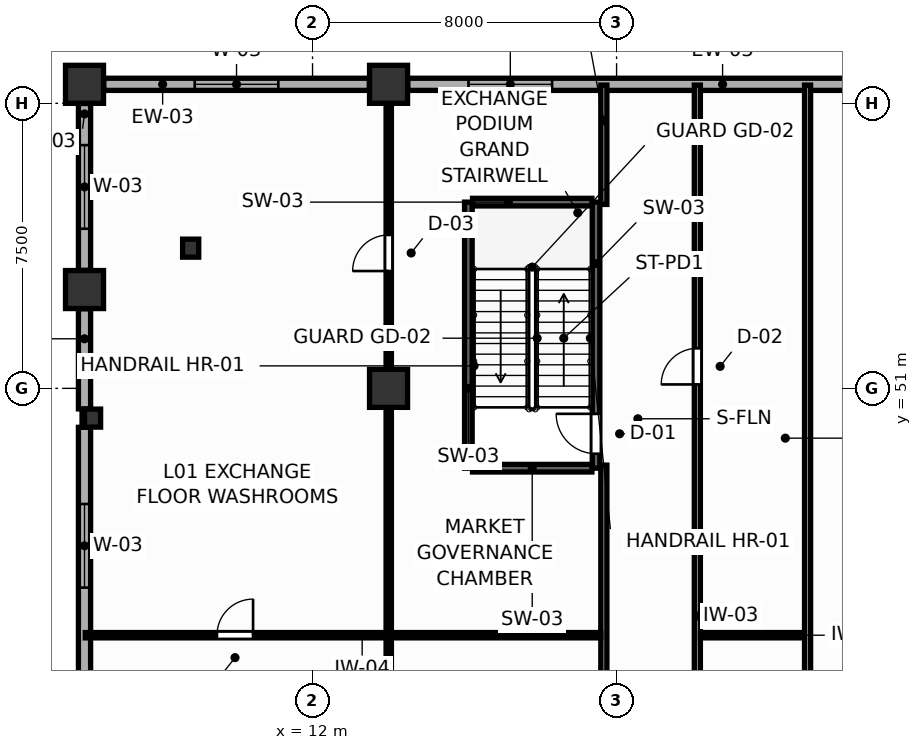
"""IFC4 building model, lengths in metres.
Left out: names, types, materials, properties, quantities, classifications, styles, units other than length and angle.
Written with IfcOpenShell. Run it as: python <this file> out.ifc"""

import sys

from ifc_helpers import new_model, si_unit, direction, frame, frame_2d, origin, origin_2d, place, context, subcontext, project, spatial, rectangle, i_section, extrude, source, transform, mapped, element, fill, save


model = new_model("IFC4")
c1 = context("Model", 3, precision=1e-05, world=origin(), true_north=direction((0.0, 1.0)))
c2 = subcontext(c1, "Body", "Model", "MODEL_VIEW")
j1 = project(units=[si_unit("LENGTHUNIT", "METRE"), si_unit("PLANEANGLEUNIT", "RADIAN")], contexts=[c1])
p1 = place(None, origin())
s1 = spatial("IfcSite", under=j1, at=p1, CompositionType="ELEMENT")
p2 = place(p1, origin())
s2 = spatial("IfcBuilding", under=s1, at=p2, CompositionType="ELEMENT")
p3 = place(p2, frame((0.0, 0.0, 4.8)))
s3 = spatial("IfcBuildingStorey", under=s2, at=p3, CompositionType="ELEMENT", Elevation=4.8)
m1 = source(origin(), c2, "Body", "SweptSolid", [
    extrude(rectangle(XDim=1.0, YDim=1.0, at=origin_2d()), origin(), (0.0, 0.0, 1.0), 4.8),
])
for number, where, z_axis, x_axis in (
    (1, (6.0, 53.6, 0.0), (0.0, 0.0, 1.0), (1.0, 0.0, 0.0)),
    (2, (6.0, 59.0, 0.0), (0.0, 0.0, 1.0), (1.0, 0.0, 0.0)),
    (3, (14.0, 59.0, 0.0), (0.0, 0.0, 1.0), (1.0, 0.0, 0.0)),
    (4, (14.0, 51.0, 0.0), (0.0, 0.0, 1.0), (1.0, 0.0, 0.0)),
):
    element("IfcColumn", number, at=place(p3, frame(where, z_axis=z_axis, x_axis=x_axis)), inside=s3, PredefinedType="COLUMN", context=c2, shape_type="MappedRepresentation", body=[
        mapped(m1, transform((0.0, 0.0, 0.0), scale=1.0)),
    ])
m2 = source(origin(), c2, "Body", "SweptSolid", [
    extrude(i_section(OverallWidth=0.424, OverallDepth=0.474, WebThickness=0.045, FlangeThickness=0.072, FilletRadius=0.015, at=origin_2d()), origin(), (0.0, 0.0, 1.0), 4.8),
])
for number, where, z_axis, x_axis in (
    (5, (8.793, 54.689, 0.0), (0.0, 0.0, 1.0), (1.0, 0.0, 0.0)),
    (6, (6.211, 50.217, 0.0), (0.0, 0.0, 1.0), (1.0, 0.0, 0.0)),
):
    element("IfcColumn", number, at=place(p3, frame(where, z_axis=z_axis, x_axis=x_axis)), inside=s3, PredefinedType="COLUMN", context=c2, shape_type="MappedRepresentation", body=[
        mapped(m2, transform((0.0, 0.0, 0.0), scale=1.0)),
    ])
p4 = place(p3, frame((6.505, 59.0, 0.0), z_axis=(0.0, 0.0, 1.0), x_axis=(1.0, 0.0, 0.0)))
e7 = element("IfcWall", 7, at=p4, inside=s3, PredefinedType="SOLIDWALL", context=c2, shape_type="SweptSolid", body=[
    extrude(rectangle(XDim=6.99, YDim=0.32, at=frame_2d((3.495, 0.0))), origin(), (0.0, 0.0, 1.0), 3.82),
])
p5 = place(p4, frame((2.395, 0.0, 0.75)))
e8 = element("IfcOpeningElement", 8, at=p5, cuts=e7, PredefinedType="OPENING", context=c2, shape_type="SweptSolid", body=[
    extrude(rectangle(XDim=2.2, YDim=2.0, at=frame_2d((1.1, 1.0))), frame((0.0, 0.17, 0.0), z_axis=(0.0, -1.0, 0.0), x_axis=(1.0, 0.0, 0.0)), (0.0, 0.0, 1.0), 0.34),
])
p6 = place(p3, frame((14.505, 59.0, 0.0), z_axis=(0.0, 0.0, 1.0), x_axis=(1.0, 0.0, 0.0)))
e9 = element("IfcWall", 9, at=p6, inside=s3, PredefinedType="SOLIDWALL", context=c2, shape_type="SweptSolid", body=[
    extrude(rectangle(XDim=12.59, YDim=0.32, at=frame_2d((6.295, 0.0))), origin(), (0.0, 0.0, 1.0), 3.82),
])
p7 = place(p6, frame((1.599, 0.0, 0.75)))
e10 = element("IfcOpeningElement", 10, at=p7, cuts=e9, PredefinedType="OPENING", context=c2, shape_type="SweptSolid", body=[
    extrude(rectangle(XDim=2.2, YDim=2.0, at=frame_2d((1.1, 1.0))), frame((0.0, 0.17, 0.0), z_axis=(0.0, -1.0, 0.0), x_axis=(1.0, 0.0, 0.0)), (0.0, 0.0, 1.0), 0.34),
])
p8 = place(p3, frame((6.0, 40.505, 0.0), z_axis=(0.0, 0.0, 1.0), x_axis=(0.0, 1.0, 0.0)))
e11 = element("IfcWall", 11, at=p8, inside=s3, PredefinedType="SOLIDWALL", context=c2, shape_type="SweptSolid", body=[
    extrude(rectangle(XDim=9.47, YDim=0.32, at=frame_2d((4.735, 0.0))), origin(), (0.0, 0.0, 1.0), 3.82),
])
p9 = place(p8, frame((5.253, 0.0, 0.75)))
e12 = element("IfcOpeningElement", 12, at=p9, cuts=e11, PredefinedType="OPENING", context=c2, shape_type="SweptSolid", body=[
    extrude(rectangle(XDim=2.2, YDim=2.0, at=frame_2d((1.1, 1.0))), frame((0.0, 0.17, 0.0), z_axis=(0.0, -1.0, 0.0), x_axis=(1.0, 0.0, 0.0)), (0.0, 0.0, 1.0), 0.34),
])
p10 = place(p3, frame((6.0, 50.459, 0.0), z_axis=(0.0, 0.0, 1.0), x_axis=(0.0, 1.0, 0.0)))
e13 = element("IfcWall", 13, at=p10, inside=s3, PredefinedType="SOLIDWALL", context=c2, shape_type="SweptSolid", body=[
    extrude(rectangle(XDim=2.636, YDim=0.32, at=frame_2d((1.318, 0.0))), origin(), (0.0, 0.0, 1.0), 3.82),
])
p11 = place(p3, frame((6.0, 54.105, 0.0), z_axis=(0.0, 0.0, 1.0), x_axis=(0.0, 1.0, 0.0)))
e14 = element("IfcWall", 14, at=p11, inside=s3, PredefinedType="SOLIDWALL", context=c2, shape_type="SweptSolid", body=[
    extrude(rectangle(XDim=4.39, YDim=0.32, at=frame_2d((2.195, 0.0))), origin(), (0.0, 0.0, 1.0), 3.82),
])
p12 = place(p11, frame((1.095, 0.0, 0.75)))
e15 = element("IfcOpeningElement", 15, at=p12, cuts=e14, PredefinedType="OPENING", context=c2, shape_type="SweptSolid", body=[
    extrude(rectangle(XDim=2.2, YDim=2.0, at=frame_2d((1.1, 1.0))), frame((0.0, 0.17, 0.0), z_axis=(0.0, -1.0, 0.0), x_axis=(1.0, 0.0, 0.0)), (0.0, 0.0, 1.0), 0.34),
])
p13 = place(p3, frame((19.46, 48.9, 0.0), z_axis=(0.0, 0.0, 1.0), x_axis=(0.0, 1.0, 0.0)))
e16 = element("IfcWall", 16, at=p13, inside=s3, PredefinedType="SHEAR", context=c2, shape_type="SweptSolid", body=[
    extrude(rectangle(XDim=7.0, YDim=0.2, at=frame_2d((3.5, 0.0))), origin(), (0.0, 0.0, 1.0), 4.8),
])
p14 = place(p13, frame((0.38, 0.0, 0.0)))
e17 = element("IfcOpeningElement", 17, at=p14, cuts=e16, PredefinedType="OPENING", context=c2, shape_type="SweptSolid", body=[
    extrude(rectangle(XDim=1.05, YDim=2.1, at=frame_2d((0.525, 1.05))), frame((0.0, 0.11, 0.0), z_axis=(0.0, -1.0, 0.0), x_axis=(1.0, 0.0, 0.0)), (0.0, 0.0, 1.0), 0.22),
])
p15 = place(p3, frame((16.1, 48.9, 0.0), z_axis=(0.0, 0.0, 1.0), x_axis=(0.0, 1.0, 0.0)))
e18 = element("IfcWall", 18, at=p15, inside=s3, PredefinedType="SHEAR", context=c2, shape_type="SweptSolid", body=[
    extrude(rectangle(XDim=7.0, YDim=0.2, at=frame_2d((3.5, 0.0))), origin(), (0.0, 0.0, 1.0), 4.8),
])
for number, where, z_axis, x_axis in (
    (19, (16.21, 55.9, 0.0), (0.0, 0.0, 1.0), (1.0, 0.0, 0.0)),
    (20, (16.21, 48.9, 0.0), (0.0, 0.0, 1.0), (1.0, 0.0, 0.0)),
):
    element("IfcWall", number, at=place(p3, frame(where, z_axis=z_axis, x_axis=x_axis)), inside=s3, PredefinedType="SHEAR", context=c2, shape_type="SweptSolid", body=[
        extrude(rectangle(XDim=3.14, YDim=0.2, at=frame_2d((1.57, 0.0))), origin(), (0.0, 0.0, 1.0), 4.8),
    ])
p16 = place(p3, frame((22.125, 32.27, 0.0), z_axis=(0.0, 0.0, 1.0), x_axis=(0.0, 1.0, 0.0)))
e21 = element("IfcWall", 21, at=p16, inside=s3, PredefinedType="PARTITIONING", context=c2, shape_type="SweptSolid", body=[
    extrude(rectangle(XDim=26.71, YDim=0.16, at=frame_2d((13.355, 0.0))), origin(), (0.0, 0.0, 1.0), 4.52),
])
p17 = place(p16, frame((5.695, 0.0, 0.0)))
e22 = element("IfcOpeningElement", 22, at=p17, cuts=e21, PredefinedType="OPENING", context=c2, shape_type="SweptSolid", body=[
    extrude(rectangle(XDim=0.95, YDim=2.05, at=frame_2d((0.475, 1.025))), frame((0.0, 0.09, 0.0), z_axis=(0.0, -1.0, 0.0), x_axis=(1.0, 0.0, 0.0)), (0.0, 0.0, 1.0), 0.18),
])
p18 = place(p16, frame((18.833, 0.0, 0.0)))
e23 = element("IfcOpeningElement", 23, at=p18, cuts=e21, PredefinedType="OPENING", context=c2, shape_type="SweptSolid", body=[
    extrude(rectangle(XDim=0.95, YDim=2.05, at=frame_2d((0.475, 1.025))), frame((0.0, 0.09, 0.0), z_axis=(0.0, -1.0, 0.0), x_axis=(1.0, 0.0, 0.0)), (0.0, 0.0, 1.0), 0.18),
])
p19 = place(p3, frame((25.025, 32.27, 0.0), z_axis=(0.0, 0.0, 1.0), x_axis=(0.0, 1.0, 0.0)))
e24 = element("IfcWall", 24, at=p19, inside=s3, PredefinedType="PARTITIONING", context=c2, shape_type="SweptSolid", body=[
    extrude(rectangle(XDim=26.71, YDim=0.16, at=frame_2d((13.355, 0.0))), origin(), (0.0, 0.0, 1.0), 4.52),
])
p20 = place(p3, frame((19.665, 32.27, 0.0), z_axis=(0.0, 0.0, 1.0), x_axis=(0.0, 1.0, 0.0)))
e25 = element("IfcWall", 25, at=p20, inside=s3, PredefinedType="PARTITIONING", context=c2, shape_type="SweptSolid", body=[
    extrude(rectangle(XDim=16.71, YDim=0.16, at=frame_2d((8.355, 0.0))), origin(), (0.0, 0.0, 1.0), 4.52),
])
p21 = place(p20, frame((2.47, 0.0, 0.0)))
e26 = element("IfcOpeningElement", 26, at=p21, cuts=e25, PredefinedType="OPENING", context=c2, shape_type="SweptSolid", body=[
    extrude(rectangle(XDim=0.95, YDim=2.05, at=frame_2d((0.475, 1.025))), frame((0.0, 0.09, 0.0), z_axis=(0.0, -1.0, 0.0), x_axis=(1.0, 0.0, 0.0)), (0.0, 0.0, 1.0), 0.18),
])
p22 = place(p3, frame((19.665, 55.84, 0.0), z_axis=(0.0, 0.0, 1.0), x_axis=(0.0, 1.0, 0.0)))
e27 = element("IfcWall", 27, at=p22, inside=s3, PredefinedType="PARTITIONING", context=c2, shape_type="SweptSolid", body=[
    extrude(rectangle(XDim=3.14, YDim=0.16, at=frame_2d((1.57, 0.0))), origin(), (0.0, 0.0, 1.0), 4.52),
])
p23 = place(p3, frame((14.005, 36.035, 0.0), z_axis=(0.0, 0.0, 1.0), x_axis=(0.0, 1.0, 0.0)))
e28 = element("IfcWall", 28, at=p23, inside=s3, PredefinedType="PARTITIONING", context=c2, shape_type="SweptSolid", body=[
    extrude(rectangle(XDim=22.945, YDim=0.14, at=frame_2d((11.473, 0.0))), origin(), (0.0, 0.0, 1.0), 3.82),
])
p24 = place(p23, frame((18.052, 0.0, 0.0)))
e29 = element("IfcOpeningElement", 29, at=p24, cuts=e28, PredefinedType="OPENING", context=c2, shape_type="SweptSolid", body=[
    extrude(rectangle(XDim=0.95, YDim=2.05, at=frame_2d((0.475, 1.025))), frame((0.0, 0.08, 0.0), z_axis=(0.0, -1.0, 0.0), x_axis=(1.0, 0.0, 0.0)), (0.0, 0.0, 1.0), 0.16),
])
p25 = place(p3, frame((6.02, 44.505, 0.0), z_axis=(0.0, 0.0, 1.0), x_axis=(1.0, 0.0, 0.0)))
e30 = element("IfcWall", 30, at=p25, inside=s3, PredefinedType="PARTITIONING", context=c2, shape_type="SweptSolid", body=[
    extrude(rectangle(XDim=13.563, YDim=0.14, at=frame_2d((6.781, 0.0))), origin(), (0.0, 0.0, 1.0), 4.52),
])
p26 = place(p25, frame((3.465, 0.0, 0.0)))
e31 = element("IfcOpeningElement", 31, at=p26, cuts=e30, PredefinedType="OPENING", context=c2, shape_type="SweptSolid", body=[
    extrude(rectangle(XDim=0.95, YDim=2.05, at=frame_2d((0.475, 1.025))), frame((0.0, 0.08, 0.0), z_axis=(0.0, -1.0, 0.0), x_axis=(1.0, 0.0, 0.0)), (0.0, 0.0, 1.0), 0.16),
])
p27 = place(p3, frame((22.207, 44.505, 0.0), z_axis=(0.0, 0.0, 1.0), x_axis=(1.0, 0.0, 0.0)))
e32 = element("IfcWall", 32, at=p27, inside=s3, PredefinedType="PARTITIONING", context=c2, shape_type="SweptSolid", body=[
    extrude(rectangle(XDim=2.736, YDim=0.14, at=frame_2d((1.368, 0.0))), origin(), (0.0, 0.0, 1.0), 4.52),
])
p28 = place(p5, origin())
e33 = element("IfcWindow", 33, at=p28, inside=s3, PartitioningType="SINGLE_PANEL", PredefinedType="WINDOW", context=c2, shape_type="SweptSolid", body=[
    extrude(rectangle(XDim=2.2, YDim=2.0, at=frame_2d((1.1, 1.0))), frame((0.0, 0.03, 0.0), z_axis=(0.0, -1.0, 0.0), x_axis=(1.0, 0.0, 0.0)), (0.0, 0.0, 1.0), 0.06),
])
fill(e8, e33)
p29 = place(p7, origin())
e34 = element("IfcWindow", 34, at=p29, inside=s3, PartitioningType="SINGLE_PANEL", PredefinedType="WINDOW", context=c2, shape_type="SweptSolid", body=[
    extrude(rectangle(XDim=2.2, YDim=2.0, at=frame_2d((1.1, 1.0))), frame((0.0, 0.03, 0.0), z_axis=(0.0, -1.0, 0.0), x_axis=(1.0, 0.0, 0.0)), (0.0, 0.0, 1.0), 0.06),
])
fill(e10, e34)
p30 = place(p9, origin())
e35 = element("IfcWindow", 35, at=p30, inside=s3, PartitioningType="SINGLE_PANEL", PredefinedType="WINDOW", context=c2, shape_type="SweptSolid", body=[
    extrude(rectangle(XDim=2.2, YDim=2.0, at=frame_2d((1.1, 1.0))), frame((0.0, 0.03, 0.0), z_axis=(0.0, -1.0, 0.0), x_axis=(1.0, 0.0, 0.0)), (0.0, 0.0, 1.0), 0.06),
])
fill(e12, e35)
p31 = place(p12, origin())
e36 = element("IfcWindow", 36, at=p31, inside=s3, PartitioningType="SINGLE_PANEL", PredefinedType="WINDOW", context=c2, shape_type="SweptSolid", body=[
    extrude(rectangle(XDim=2.2, YDim=2.0, at=frame_2d((1.1, 1.0))), frame((0.0, 0.03, 0.0), z_axis=(0.0, -1.0, 0.0), x_axis=(1.0, 0.0, 0.0)), (0.0, 0.0, 1.0), 0.06),
])
fill(e15, e36)
p32 = place(p14, origin())
e37 = element("IfcDoor", 37, at=p32, inside=s3, OperationType="SINGLE_SWING_RIGHT", PredefinedType="DOOR", context=c2, shape_type="SweptSolid", body=[
    extrude(rectangle(XDim=1.05, YDim=2.1, at=frame_2d((0.525, 1.05))), frame((0.0, 0.025, 0.0), z_axis=(0.0, -1.0, 0.0), x_axis=(1.0, 0.0, 0.0)), (0.0, 0.0, 1.0), 0.05),
])
fill(e17, e37)
p33 = place(p18, origin())
e38 = element("IfcDoor", 38, at=p33, inside=s3, OperationType="SINGLE_SWING_LEFT", PredefinedType="DOOR", context=c2, shape_type="SweptSolid", body=[
    extrude(rectangle(XDim=0.95, YDim=2.05, at=frame_2d((0.475, 1.025))), frame((0.0, 0.025, 0.0), z_axis=(0.0, -1.0, 0.0), x_axis=(1.0, 0.0, 0.0)), (0.0, 0.0, 1.0), 0.05),
])
fill(e23, e38)
p34 = place(p24, origin())
e39 = element("IfcDoor", 39, at=p34, inside=s3, OperationType="SINGLE_SWING_LEFT", PredefinedType="DOOR", context=c2, shape_type="SweptSolid", body=[
    extrude(rectangle(XDim=0.95, YDim=2.05, at=frame_2d((0.475, 1.025))), frame((0.0, 0.025, 0.0), z_axis=(0.0, -1.0, 0.0), x_axis=(1.0, 0.0, 0.0)), (0.0, 0.0, 1.0), 0.05),
])
fill(e29, e39)
p35 = place(p26, origin())
e40 = element("IfcDoor", 40, at=p35, inside=s3, OperationType="SINGLE_SWING_RIGHT", PredefinedType="DOOR", context=c2, shape_type="SweptSolid", body=[
    extrude(rectangle(XDim=0.95, YDim=2.05, at=frame_2d((0.475, 1.025))), frame((0.0, 0.025, 0.0), z_axis=(0.0, -1.0, 0.0), x_axis=(1.0, 0.0, 0.0)), (0.0, 0.0, 1.0), 0.05),
])
fill(e31, e40)
save(model, sys.argv[1])
